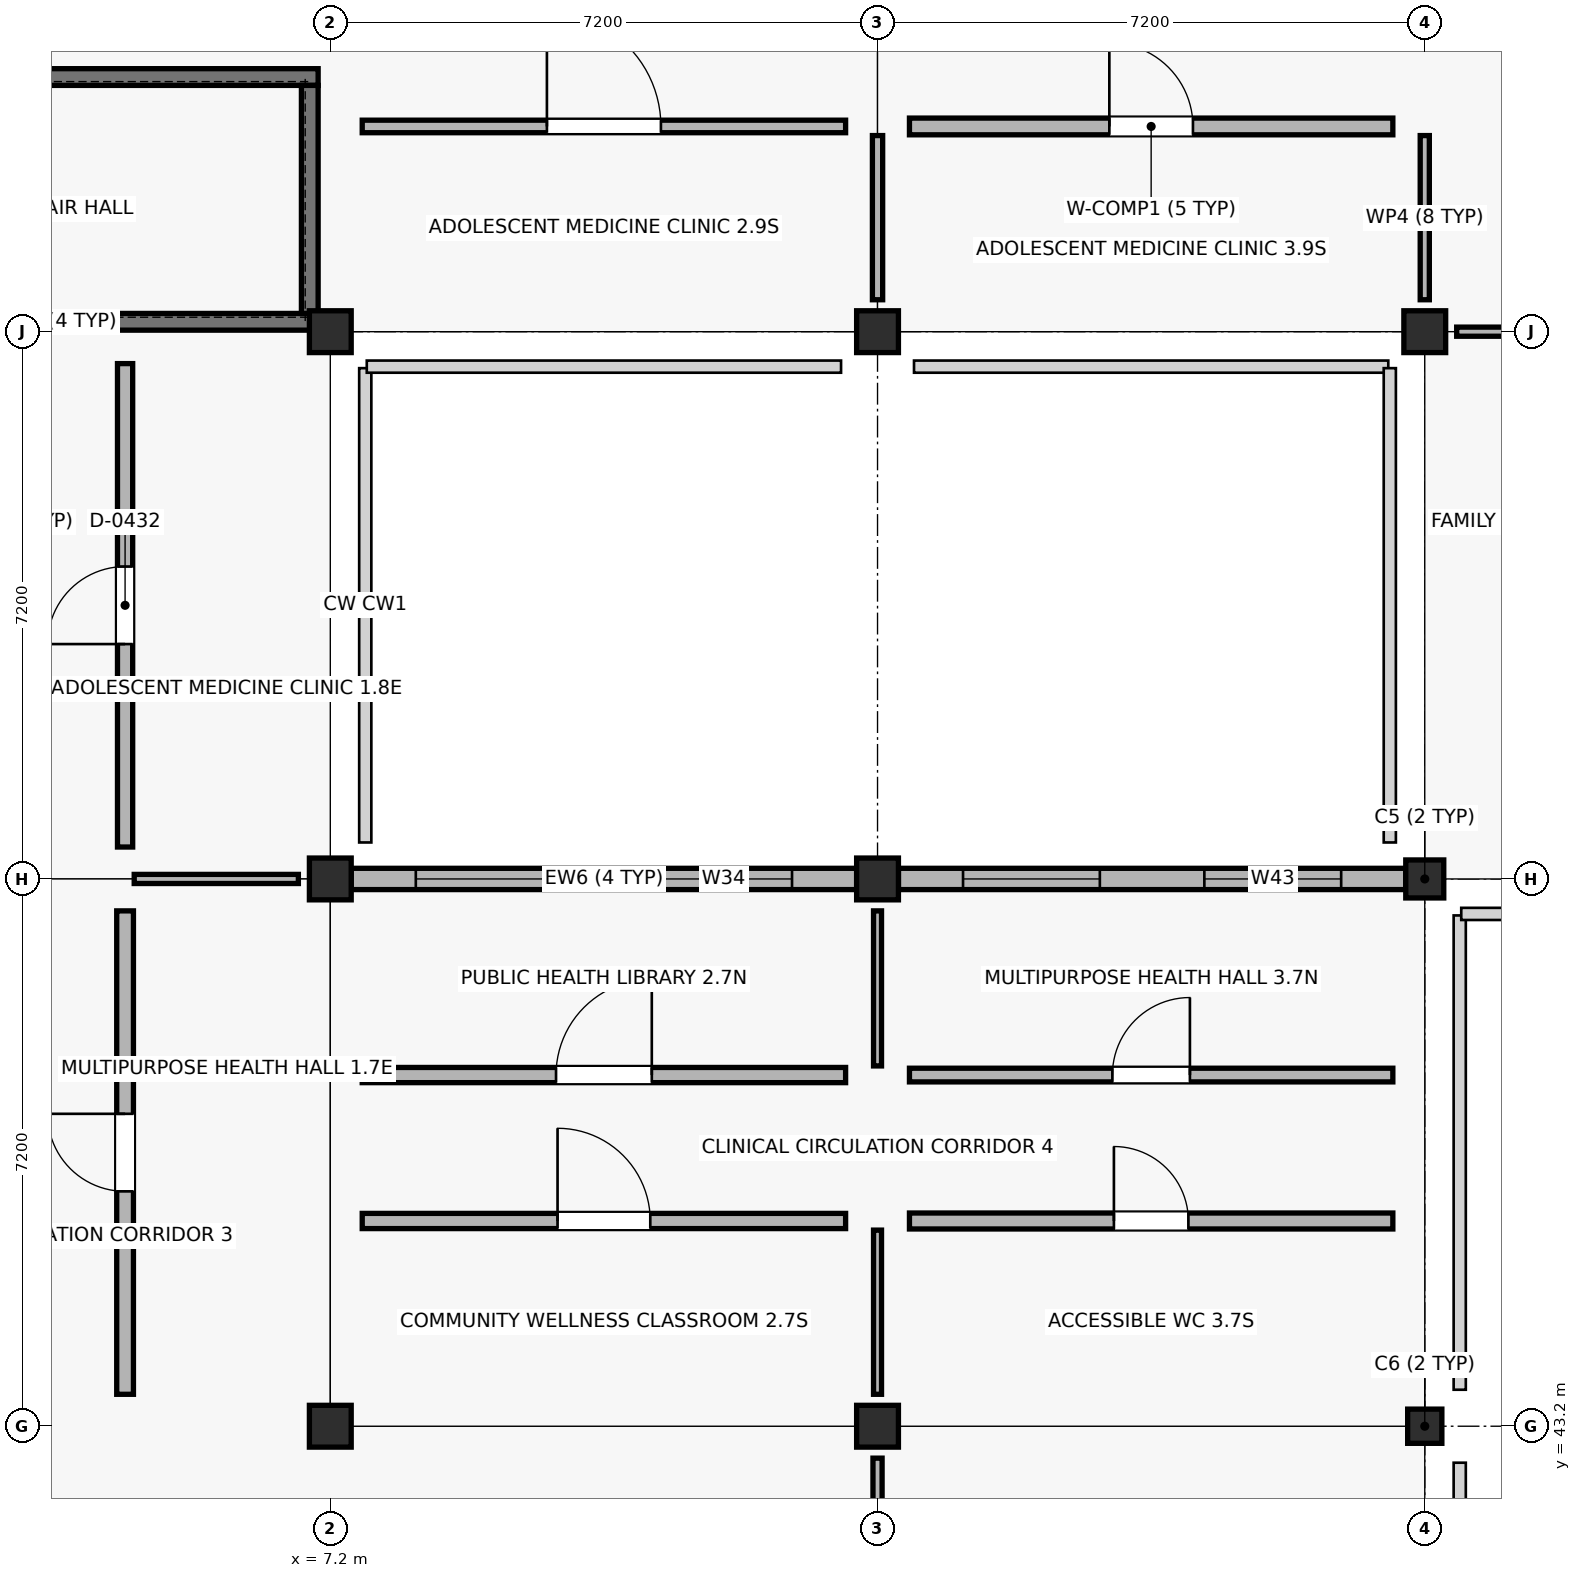
"""IFC4 building model, lengths in metres.
Left out: names, types, materials, properties, quantities, classifications, styles, units other than length and angle.
Written with IfcOpenShell. Run it as: python <this file> out.ifc"""

import sys

from ifc_helpers import new_model, si_unit, direction, frame, frame_2d, origin, origin_2d, place, context, subcontext, project, spatial, rectangle, extrude, element, fill, save


model = new_model("IFC4")
c1 = context("Model", 3, precision=1e-05, world=origin(), true_north=direction((0.0, 1.0)))
c2 = subcontext(c1, "Body", "Model", "MODEL_VIEW")
j1 = project(units=[si_unit("LENGTHUNIT", "METRE"), si_unit("PLANEANGLEUNIT", "RADIAN")], contexts=[c1])
p1 = place(None, origin())
s1 = spatial("IfcSite", under=j1, at=p1, CompositionType="ELEMENT")
p2 = place(p1, origin())
s2 = spatial("IfcBuilding", under=s1, at=p2, CompositionType="ELEMENT")
p3 = place(p2, frame((0.0, 0.0, 9.0)))
s3 = spatial("IfcBuildingStorey", under=s2, at=p3, CompositionType="ELEMENT", Elevation=9.0)
for number, where, z_axis, x_axis in (
    (1, (7.2, 43.2, 0.0), (0.0, 0.0, 1.0), (1.0, 0.0, 0.0)),
    (2, (7.2, 50.4, 0.0), (0.0, 0.0, 1.0), (1.0, 0.0, 0.0)),
    (3, (7.2, 57.6, 0.0), (0.0, 0.0, 1.0), (1.0, 0.0, 0.0)),
    (4, (14.4, 43.2, 0.0), (0.0, 0.0, 1.0), (1.0, 0.0, 0.0)),
    (5, (14.4, 50.4, 0.0), (0.0, 0.0, 1.0), (1.0, 0.0, 0.0)),
    (6, (14.4, 57.6, 0.0), (0.0, 0.0, 1.0), (1.0, 0.0, 0.0)),
):
    element("IfcColumn", number, at=place(p3, frame(where, z_axis=z_axis, x_axis=x_axis)), inside=s3, PredefinedType="COLUMN", context=c2, shape_type="SweptSolid", body=[
        extrude(rectangle(XDim=0.55, YDim=0.55, at=origin_2d()), origin(), (0.0, 0.0, 1.0), 4.5),
    ])
p4 = place(p3, frame((21.6, 43.2, 0.0), z_axis=(0.0, 0.0, 1.0), x_axis=(1.0, 0.0, 0.0)))
e7 = element("IfcColumn", 7, at=p4, inside=s3, PredefinedType="COLUMN", context=c2, shape_type="SweptSolid", body=[
    extrude(rectangle(XDim=0.45, YDim=0.45, at=origin_2d()), origin(), (0.0, 0.0, 1.0), 4.28),
])
p5 = place(p3, frame((21.6, 50.4, 0.0), z_axis=(0.0, 0.0, 1.0), x_axis=(1.0, 0.0, 0.0)))
e8 = element("IfcColumn", 8, at=p5, inside=s3, PredefinedType="COLUMN", context=c2, shape_type="SweptSolid", body=[
    extrude(rectangle(XDim=0.5, YDim=0.5, at=origin_2d()), origin(), (0.0, 0.0, 1.0), 4.28),
])
p6 = place(p3, frame((21.6, 57.6, 0.0), z_axis=(0.0, 0.0, 1.0), x_axis=(1.0, 0.0, 0.0)))
e9 = element("IfcColumn", 9, at=p6, inside=s3, PredefinedType="COLUMN", context=c2, shape_type="SweptSolid", body=[
    extrude(rectangle(XDim=0.55, YDim=0.55, at=origin_2d()), origin(), (0.0, 0.0, 1.0), 4.5),
])
p7 = place(p3, frame((14.125, 50.4, 0.0), z_axis=(0.0, 0.0, 1.0), x_axis=(-1.0, 0.0, 0.0)))
e10 = element("IfcWall", 10, at=p7, inside=s3, PredefinedType="STANDARD", context=c2, shape_type="SweptSolid", body=[
    extrude(rectangle(XDim=6.65, YDim=0.28, at=frame_2d((3.325, 0.0))), origin(), (0.0, 0.0, 1.0), 3.59),
])
p8 = place(p7, frame((0.85, 0.0, 0.9)))
e11 = element("IfcOpeningElement", 11, at=p8, cuts=e10, PredefinedType="OPENING", context=c2, shape_type="SweptSolid", body=[
    extrude(rectangle(XDim=1.8, YDim=1.62, at=frame_2d((0.9, 0.81))), frame((0.0, 0.15, 0.0), z_axis=(0.0, -1.0, 0.0), x_axis=(1.0, 0.0, 0.0)), (0.0, 0.0, 1.0), 0.3),
])
p9 = place(p7, frame((4.0, 0.0, 0.9)))
e12 = element("IfcOpeningElement", 12, at=p9, cuts=e10, PredefinedType="OPENING", context=c2, shape_type="SweptSolid", body=[
    extrude(rectangle(XDim=1.8, YDim=1.62, at=frame_2d((0.9, 0.81))), frame((0.0, 0.15, 0.0), z_axis=(0.0, -1.0, 0.0), x_axis=(1.0, 0.0, 0.0)), (0.0, 0.0, 1.0), 0.3),
])
p10 = place(p3, frame((21.35, 50.4, 0.0), z_axis=(0.0, 0.0, 1.0), x_axis=(-1.0, 0.0, 0.0)))
e13 = element("IfcWall", 13, at=p10, inside=s3, PredefinedType="STANDARD", context=c2, shape_type="SweptSolid", body=[
    extrude(rectangle(XDim=6.675, YDim=0.28, at=frame_2d((3.337, 0.0))), origin(), (0.0, 0.0, 1.0), 3.59),
])
p11 = place(p10, frame((0.85, 0.0, 0.9)))
e14 = element("IfcOpeningElement", 14, at=p11, cuts=e13, PredefinedType="OPENING", context=c2, shape_type="SweptSolid", body=[
    extrude(rectangle(XDim=1.8, YDim=1.75, at=frame_2d((0.9, 0.875))), frame((0.0, 0.15, 0.0), z_axis=(0.0, -1.0, 0.0), x_axis=(1.0, 0.0, 0.0)), (0.0, 0.0, 1.0), 0.3),
])
p12 = place(p10, frame((4.025, 0.0, 0.9)))
e15 = element("IfcOpeningElement", 15, at=p12, cuts=e13, PredefinedType="OPENING", context=c2, shape_type="SweptSolid", body=[
    extrude(rectangle(XDim=1.8, YDim=1.75, at=frame_2d((0.9, 0.875))), frame((0.0, 0.15, 0.0), z_axis=(0.0, -1.0, 0.0), x_axis=(1.0, 0.0, 0.0)), (0.0, 0.0, 1.0), 0.3),
])
p13 = place(p3, frame((0.16, 57.73, 0.0), z_axis=(0.0, 0.0, 1.0), x_axis=(1.0, 0.0, 0.0)))
e16 = element("IfcWall", 16, at=p13, inside=s3, PredefinedType="SHEAR", context=c2, shape_type="SweptSolid", body=[
    extrude(rectangle(XDim=6.88, YDim=0.22, at=frame_2d((3.44, 0.0))), origin(), (0.0, 0.0, 1.0), 4.24),
])
p14 = place(p3, frame((0.16, 60.95, 0.0), z_axis=(0.0, 0.0, 1.0), x_axis=(1.0, 0.0, 0.0)))
e17 = element("IfcWall", 17, at=p14, inside=s3, PredefinedType="SHEAR", context=c2, shape_type="SweptSolid", body=[
    extrude(rectangle(XDim=6.88, YDim=0.22, at=frame_2d((3.44, 0.0))), origin(), (0.0, 0.0, 1.0), 4.24),
])
p15 = place(p14, frame((0.35, 0.0, 0.0)))
e18 = element("IfcOpeningElement", 18, at=p15, cuts=e17, PredefinedType="OPENING", context=c2, shape_type="SweptSolid", body=[
    extrude(rectangle(XDim=1.2, YDim=2.15, at=frame_2d((0.6, 1.075))), frame((0.0, 0.12, 0.0), z_axis=(0.0, -1.0, 0.0), x_axis=(1.0, 0.0, 0.0)), (0.0, 0.0, 1.0), 0.24),
])
p16 = place(p3, frame((6.93, 57.84, 0.0), z_axis=(0.0, 0.0, 1.0), x_axis=(0.0, 1.0, 0.0)))
e19 = element("IfcWall", 19, at=p16, inside=s3, PredefinedType="SHEAR", context=c2, shape_type="SweptSolid", body=[
    extrude(rectangle(XDim=3.0, YDim=0.22, at=frame_2d((1.5, 0.0))), origin(), (0.0, 0.0, 1.0), 4.24),
])
p17 = place(p3, frame((4.5, 50.82, 0.0), z_axis=(0.0, 0.0, 1.0), x_axis=(0.0, 1.0, 0.0)))
e20 = element("IfcWall", 20, at=p17, inside=s3, PredefinedType="SOLIDWALL", context=c2, shape_type="SweptSolid", body=[
    extrude(rectangle(XDim=6.36, YDim=0.2, at=frame_2d((3.18, 0.0))), origin(), (0.0, 0.0, 1.0), 3.38),
])
p18 = place(p17, frame((2.67, 0.0, 0.0)))
e21 = element("IfcOpeningElement", 21, at=p18, cuts=e20, PredefinedType="OPENING", context=c2, shape_type="SweptSolid", body=[
    extrude(rectangle(XDim=1.02, YDim=2.04, at=frame_2d((0.51, 1.02))), frame((0.0, 0.11, 0.0), z_axis=(0.0, -1.0, 0.0), x_axis=(1.0, 0.0, 0.0)), (0.0, 0.0, 1.0), 0.22),
])
p19 = place(p3, frame((7.62, 60.3, 0.0), z_axis=(0.0, 0.0, 1.0), x_axis=(1.0, 0.0, 0.0)))
e22 = element("IfcWall", 22, at=p19, inside=s3, PredefinedType="PARTITIONING", context=c2, shape_type="SweptSolid", body=[
    extrude(rectangle(XDim=6.36, YDim=0.165, at=frame_2d((3.18, 0.0))), origin(), (0.0, 0.0, 1.0), 3.38),
])
p20 = place(p19, frame((2.43, 0.0, 0.0)))
e23 = element("IfcOpeningElement", 23, at=p20, cuts=e22, PredefinedType="OPENING", context=c2, shape_type="SweptSolid", body=[
    extrude(rectangle(XDim=1.5, YDim=2.04, at=frame_2d((0.75, 1.02))), frame((0.0, 0.093, 0.0), z_axis=(0.0, -1.0, 0.0), x_axis=(1.0, 0.0, 0.0)), (0.0, 0.0, 1.0), 0.185),
])
p21 = place(p3, frame((14.4, 58.02, 0.0), z_axis=(0.0, 0.0, 1.0), x_axis=(0.0, 1.0, 0.0)))
e24 = element("IfcWall", 24, at=p21, inside=s3, PredefinedType="PARTITIONING", context=c2, shape_type="SweptSolid", body=[
    extrude(rectangle(XDim=2.16, YDim=0.135, at=frame_2d((1.08, 0.0))), origin(), (0.0, 0.0, 1.0), 3.38),
])
p22 = place(p3, frame((14.82, 60.3, 0.0), z_axis=(0.0, 0.0, 1.0), x_axis=(1.0, 0.0, 0.0)))
e25 = element("IfcWall", 25, at=p22, inside=s3, PredefinedType="SOLIDWALL", context=c2, shape_type="SweptSolid", body=[
    extrude(rectangle(XDim=6.36, YDim=0.22, at=frame_2d((3.18, 0.0))), origin(), (0.0, 0.0, 1.0), 3.38),
])
p23 = place(p22, frame((2.63, 0.0, 0.0)))
e26 = element("IfcOpeningElement", 26, at=p23, cuts=e25, PredefinedType="OPENING", context=c2, shape_type="SweptSolid", body=[
    extrude(rectangle(XDim=1.1, YDim=2.09, at=frame_2d((0.55, 1.045))), frame((0.0, 0.12, 0.0), z_axis=(0.0, -1.0, 0.0), x_axis=(1.0, 0.0, 0.0)), (0.0, 0.0, 1.0), 0.24),
])
for number, where, z_axis, x_axis in (
    (27, (21.6, 58.02, 0.0), (0.0, 0.0, 1.0), (0.0, 1.0, 0.0)),
    (28, (22.02, 57.6, 0.0), (0.0, 0.0, 1.0), (1.0, 0.0, 0.0)),
):
    element("IfcWall", number, at=place(p3, frame(where, z_axis=z_axis, x_axis=x_axis)), inside=s3, PredefinedType="PARTITIONING", context=c2, shape_type="SweptSolid", body=[
        extrude(rectangle(XDim=2.16, YDim=0.12, at=frame_2d((1.08, 0.0))), origin(), (0.0, 0.0, 1.0), 3.38),
    ])
p24 = place(p3, frame((4.5, 43.62, 0.0), z_axis=(0.0, 0.0, 1.0), x_axis=(0.0, 1.0, 0.0)))
e29 = element("IfcWall", 29, at=p24, inside=s3, PredefinedType="SOLIDWALL", context=c2, shape_type="SweptSolid", body=[
    extrude(rectangle(XDim=6.36, YDim=0.22, at=frame_2d((3.18, 0.0))), origin(), (0.0, 0.0, 1.0), 3.38),
])
p25 = place(p24, frame((2.67, 0.0, 0.0)))
e30 = element("IfcOpeningElement", 30, at=p25, cuts=e29, PredefinedType="OPENING", context=c2, shape_type="SweptSolid", body=[
    extrude(rectangle(XDim=1.02, YDim=2.09, at=frame_2d((0.51, 1.045))), frame((0.0, 0.12, 0.0), z_axis=(0.0, -1.0, 0.0), x_axis=(1.0, 0.0, 0.0)), (0.0, 0.0, 1.0), 0.24),
])
p26 = place(p3, frame((4.62, 50.4, 0.0), z_axis=(0.0, 0.0, 1.0), x_axis=(1.0, 0.0, 0.0)))
e31 = element("IfcWall", 31, at=p26, inside=s3, PredefinedType="PARTITIONING", context=c2, shape_type="SweptSolid", body=[
    extrude(rectangle(XDim=2.16, YDim=0.12, at=frame_2d((1.08, 0.0))), origin(), (0.0, 0.0, 1.0), 3.38),
])
p27 = place(p3, frame((14.4, 40.74, 0.0), z_axis=(0.0, 0.0, 1.0), x_axis=(0.0, 1.0, 0.0)))
e32 = element("IfcWall", 32, at=p27, inside=s3, PredefinedType="PARTITIONING", context=c2, shape_type="SweptSolid", body=[
    extrude(rectangle(XDim=2.04, YDim=0.12, at=frame_2d((1.02, 0.0))), origin(), (0.0, 0.0, 1.0), 3.38),
])
p28 = place(p3, frame((7.62, 45.9, 0.0), z_axis=(0.0, 0.0, 1.0), x_axis=(1.0, 0.0, 0.0)))
e33 = element("IfcWall", 33, at=p28, inside=s3, PredefinedType="SOLIDWALL", context=c2, shape_type="SweptSolid", body=[
    extrude(rectangle(XDim=6.36, YDim=0.2, at=frame_2d((3.18, 0.0))), origin(), (0.0, 0.0, 1.0), 3.38),
])
p29 = place(p28, frame((2.57, 0.0, 0.0)))
e34 = element("IfcOpeningElement", 34, at=p29, cuts=e33, PredefinedType="OPENING", context=c2, shape_type="SweptSolid", body=[
    extrude(rectangle(XDim=1.22, YDim=2.09, at=frame_2d((0.61, 1.045))), frame((0.0, 0.11, 0.0), z_axis=(0.0, -1.0, 0.0), x_axis=(1.0, 0.0, 0.0)), (0.0, 0.0, 1.0), 0.22),
])
p30 = place(p3, frame((14.4, 43.62, 0.0), z_axis=(0.0, 0.0, 1.0), x_axis=(0.0, 1.0, 0.0)))
e35 = element("IfcWall", 35, at=p30, inside=s3, PredefinedType="PARTITIONING", context=c2, shape_type="SweptSolid", body=[
    extrude(rectangle(XDim=2.16, YDim=0.105, at=frame_2d((1.08, 0.0))), origin(), (0.0, 0.0, 1.0), 3.38),
])
p31 = place(p3, frame((7.62, 47.82, 0.0), z_axis=(0.0, 0.0, 1.0), x_axis=(1.0, 0.0, 0.0)))
e36 = element("IfcWall", 36, at=p31, inside=s3, PredefinedType="SOLIDWALL", context=c2, shape_type="SweptSolid", body=[
    extrude(rectangle(XDim=6.36, YDim=0.2, at=frame_2d((3.18, 0.0))), origin(), (0.0, 0.0, 1.0), 3.38),
])
p32 = place(p31, frame((2.55, 0.0, 0.0)))
e37 = element("IfcOpeningElement", 37, at=p32, cuts=e36, PredefinedType="OPENING", context=c2, shape_type="SweptSolid", body=[
    extrude(rectangle(XDim=1.26, YDim=2.09, at=frame_2d((0.63, 1.045))), frame((0.0, 0.11, 0.0), z_axis=(0.0, -1.0, 0.0), x_axis=(1.0, 0.0, 0.0)), (0.0, 0.0, 1.0), 0.22),
])
p33 = place(p3, frame((14.4, 47.94, 0.0), z_axis=(0.0, 0.0, 1.0), x_axis=(0.0, 1.0, 0.0)))
e38 = element("IfcWall", 38, at=p33, inside=s3, PredefinedType="PARTITIONING", context=c2, shape_type="SweptSolid", body=[
    extrude(rectangle(XDim=2.04, YDim=0.105, at=frame_2d((1.02, 0.0))), origin(), (0.0, 0.0, 1.0), 3.38),
])
p34 = place(p3, frame((14.82, 45.9, 0.0), z_axis=(0.0, 0.0, 1.0), x_axis=(1.0, 0.0, 0.0)))
e39 = element("IfcWall", 39, at=p34, inside=s3, PredefinedType="PLUMBINGWALL", context=c2, shape_type="SweptSolid", body=[
    extrude(rectangle(XDim=6.36, YDim=0.21, at=frame_2d((3.18, 0.0))), origin(), (0.0, 0.0, 1.0), 3.38),
])
p35 = place(p34, frame((2.69, 0.0, 0.0)))
e40 = element("IfcOpeningElement", 40, at=p35, cuts=e39, PredefinedType="OPENING", context=c2, shape_type="SweptSolid", body=[
    extrude(rectangle(XDim=0.98, YDim=2.14, at=frame_2d((0.49, 1.07))), frame((0.0, 0.115, 0.0), z_axis=(0.0, -1.0, 0.0), x_axis=(1.0, 0.0, 0.0)), (0.0, 0.0, 1.0), 0.23),
])
p36 = place(p3, frame((14.82, 47.82, 0.0), z_axis=(0.0, 0.0, 1.0), x_axis=(1.0, 0.0, 0.0)))
e41 = element("IfcWall", 41, at=p36, inside=s3, PredefinedType="PARTITIONING", context=c2, shape_type="SweptSolid", body=[
    extrude(rectangle(XDim=6.36, YDim=0.18, at=frame_2d((3.18, 0.0))), origin(), (0.0, 0.0, 1.0), 3.38),
])
p37 = place(p36, frame((2.67, 0.0, 0.0)))
e42 = element("IfcOpeningElement", 42, at=p37, cuts=e41, PredefinedType="OPENING", context=c2, shape_type="SweptSolid", body=[
    extrude(rectangle(XDim=1.02, YDim=2.14, at=frame_2d((0.51, 1.07))), frame((0.0, 0.1, 0.0), z_axis=(0.0, -1.0, 0.0), x_axis=(1.0, 0.0, 0.0)), (0.0, 0.0, 1.0), 0.2),
])
p38 = place(p8, origin())
e43 = element("IfcWindow", 43, at=p38, inside=s3, PartitioningType="SINGLE_PANEL", PredefinedType="WINDOW", context=c2, shape_type="SweptSolid", body=[
    extrude(rectangle(XDim=1.8, YDim=1.62, at=frame_2d((0.9, 0.81))), frame((0.0, 0.03, 0.0), z_axis=(0.0, -1.0, 0.0), x_axis=(1.0, 0.0, 0.0)), (0.0, 0.0, 1.0), 0.06),
])
fill(e11, e43)
p39 = place(p9, origin())
e44 = element("IfcWindow", 44, at=p39, inside=s3, PartitioningType="SINGLE_PANEL", PredefinedType="WINDOW", context=c2, shape_type="SweptSolid", body=[
    extrude(rectangle(XDim=1.8, YDim=1.62, at=frame_2d((0.9, 0.81))), frame((0.0, 0.03, 0.0), z_axis=(0.0, -1.0, 0.0), x_axis=(1.0, 0.0, 0.0)), (0.0, 0.0, 1.0), 0.06),
])
fill(e12, e44)
p40 = place(p11, origin())
e45 = element("IfcWindow", 45, at=p40, inside=s3, PartitioningType="SINGLE_PANEL", PredefinedType="WINDOW", context=c2, shape_type="SweptSolid", body=[
    extrude(rectangle(XDim=1.8, YDim=1.75, at=frame_2d((0.9, 0.875))), frame((0.0, 0.03, 0.0), z_axis=(0.0, -1.0, 0.0), x_axis=(1.0, 0.0, 0.0)), (0.0, 0.0, 1.0), 0.06),
])
fill(e14, e45)
p41 = place(p12, origin())
e46 = element("IfcWindow", 46, at=p41, inside=s3, PartitioningType="SINGLE_PANEL", PredefinedType="WINDOW", context=c2, shape_type="SweptSolid", body=[
    extrude(rectangle(XDim=1.8, YDim=1.75, at=frame_2d((0.9, 0.875))), frame((0.0, 0.03, 0.0), z_axis=(0.0, -1.0, 0.0), x_axis=(1.0, 0.0, 0.0)), (0.0, 0.0, 1.0), 0.06),
])
fill(e15, e46)
p42 = place(p18, origin())
e47 = element("IfcDoor", 47, at=p42, inside=s3, OperationType="SINGLE_SWING_LEFT", PredefinedType="DOOR", context=c2, shape_type="SweptSolid", body=[
    extrude(rectangle(XDim=1.02, YDim=2.04, at=frame_2d((0.51, 1.02))), frame((0.0, 0.025, 0.0), z_axis=(0.0, -1.0, 0.0), x_axis=(1.0, 0.0, 0.0)), (0.0, 0.0, 1.0), 0.05),
])
fill(e21, e47)
p43 = place(p20, origin())
e48 = element("IfcDoor", 48, at=p43, inside=s3, OperationType="SINGLE_SWING_LEFT", PredefinedType="DOOR", context=c2, shape_type="SweptSolid", body=[
    extrude(rectangle(XDim=1.5, YDim=2.04, at=frame_2d((0.75, 1.02))), frame((0.0, 0.025, 0.0), z_axis=(0.0, -1.0, 0.0), x_axis=(1.0, 0.0, 0.0)), (0.0, 0.0, 1.0), 0.05),
])
fill(e23, e48)
p44 = place(p23, origin())
e49 = element("IfcDoor", 49, at=p44, inside=s3, OperationType="SINGLE_SWING_LEFT", PredefinedType="DOOR", context=c2, shape_type="SweptSolid", body=[
    extrude(rectangle(XDim=1.1, YDim=2.09, at=frame_2d((0.55, 1.045))), frame((0.0, 0.025, 0.0), z_axis=(0.0, -1.0, 0.0), x_axis=(1.0, 0.0, 0.0)), (0.0, 0.0, 1.0), 0.05),
])
fill(e26, e49)
p45 = place(p25, origin())
e50 = element("IfcDoor", 50, at=p45, inside=s3, OperationType="SINGLE_SWING_RIGHT", PredefinedType="DOOR", context=c2, shape_type="SweptSolid", body=[
    extrude(rectangle(XDim=1.02, YDim=2.09, at=frame_2d((0.51, 1.045))), frame((0.0, 0.025, 0.0), z_axis=(0.0, -1.0, 0.0), x_axis=(1.0, 0.0, 0.0)), (0.0, 0.0, 1.0), 0.05),
])
fill(e30, e50)
p46 = place(p29, origin())
e51 = element("IfcDoor", 51, at=p46, inside=s3, OperationType="SINGLE_SWING_LEFT", PredefinedType="DOOR", context=c2, shape_type="SweptSolid", body=[
    extrude(rectangle(XDim=1.22, YDim=2.09, at=frame_2d((0.61, 1.045))), frame((0.0, 0.025, 0.0), z_axis=(0.0, -1.0, 0.0), x_axis=(1.0, 0.0, 0.0)), (0.0, 0.0, 1.0), 0.05),
])
fill(e34, e51)
p47 = place(p32, origin())
e52 = element("IfcDoor", 52, at=p47, inside=s3, OperationType="SINGLE_SWING_RIGHT", PredefinedType="DOOR", context=c2, shape_type="SweptSolid", body=[
    extrude(rectangle(XDim=1.26, YDim=2.09, at=frame_2d((0.63, 1.045))), frame((0.0, 0.025, 0.0), z_axis=(0.0, -1.0, 0.0), x_axis=(1.0, 0.0, 0.0)), (0.0, 0.0, 1.0), 0.05),
])
fill(e37, e52)
p48 = place(p35, origin())
e53 = element("IfcDoor", 53, at=p48, inside=s3, OperationType="SINGLE_SWING_LEFT", PredefinedType="DOOR", context=c2, shape_type="SweptSolid", body=[
    extrude(rectangle(XDim=0.98, YDim=2.14, at=frame_2d((0.49, 1.07))), frame((0.0, 0.025, 0.0), z_axis=(0.0, -1.0, 0.0), x_axis=(1.0, 0.0, 0.0)), (0.0, 0.0, 1.0), 0.05),
])
fill(e40, e53)
p49 = place(p37, origin())
e54 = element("IfcDoor", 54, at=p49, inside=s3, OperationType="SINGLE_SWING_RIGHT", PredefinedType="DOOR", context=c2, shape_type="SweptSolid", body=[
    extrude(rectangle(XDim=1.02, YDim=2.14, at=frame_2d((0.51, 1.07))), frame((0.0, 0.025, 0.0), z_axis=(0.0, -1.0, 0.0), x_axis=(1.0, 0.0, 0.0)), (0.0, 0.0, 1.0), 0.05),
])
fill(e42, e54)
save(model, sys.argv[1])
